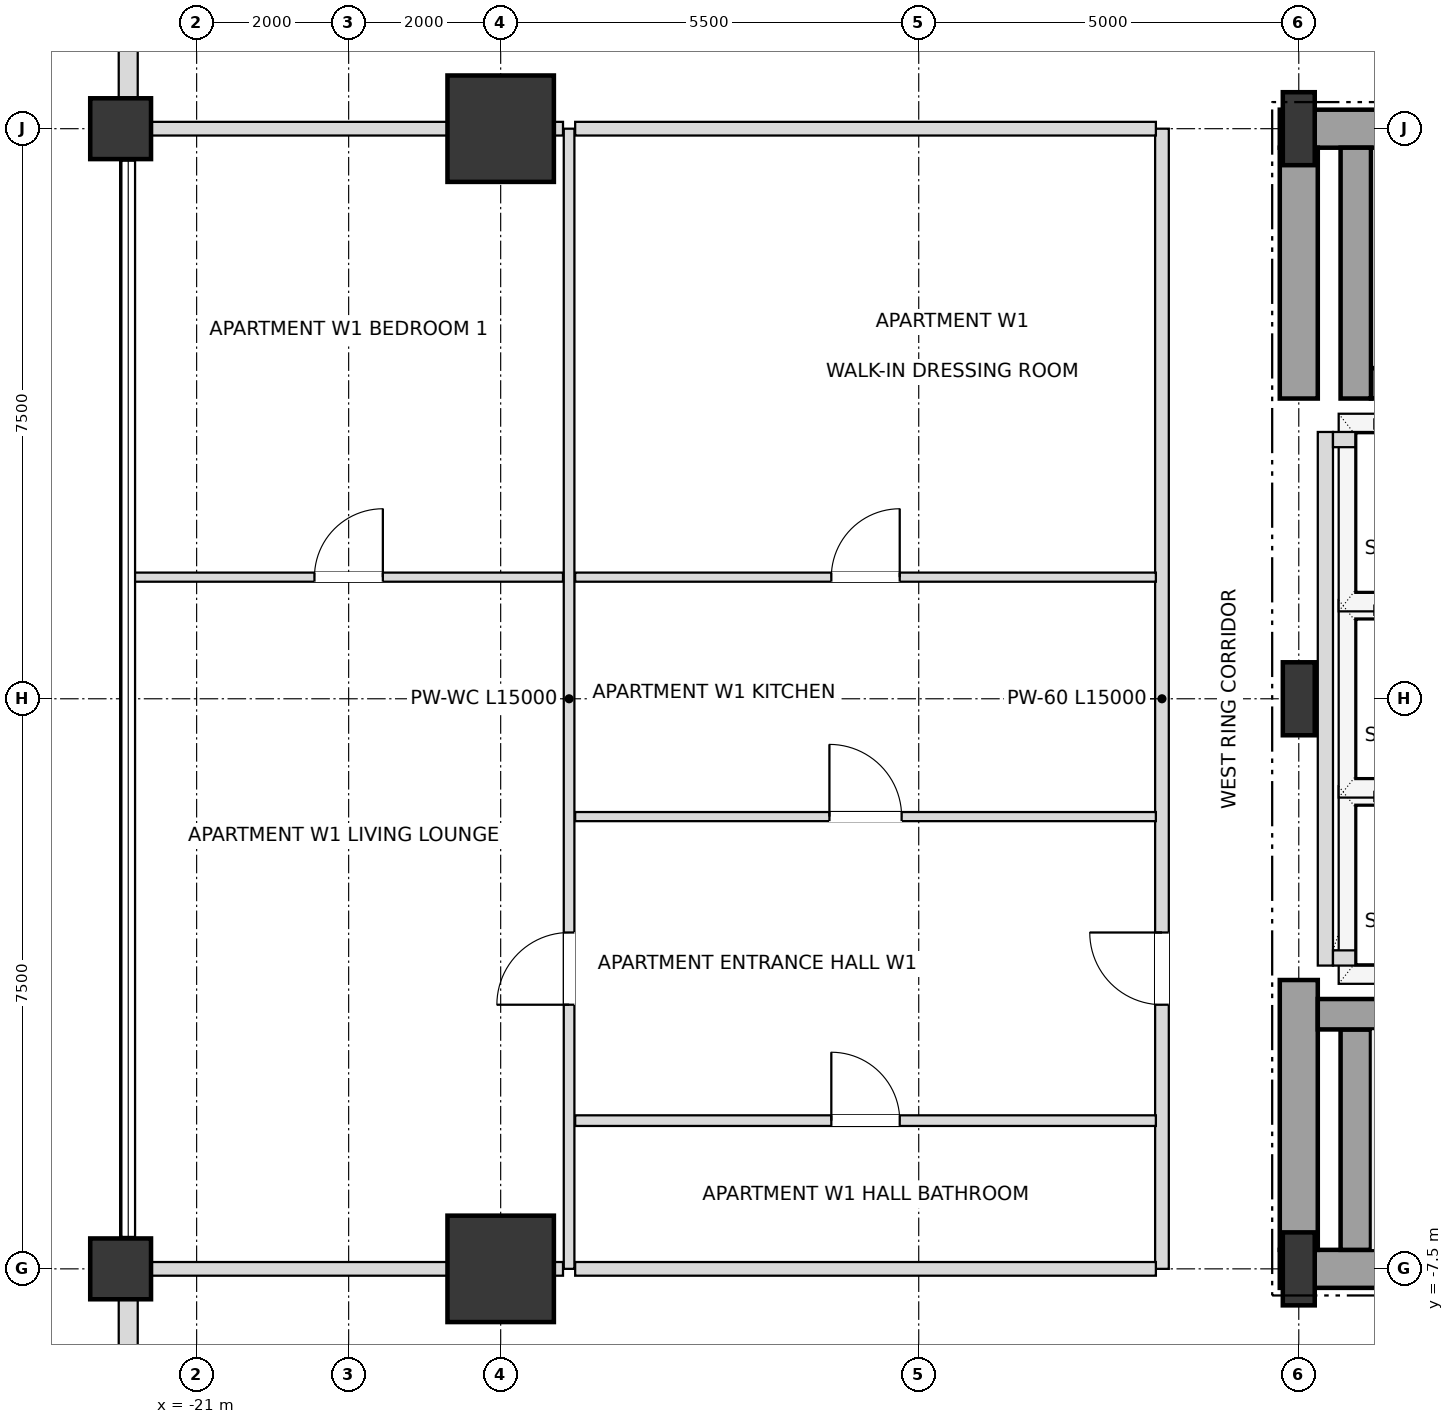
"""IFC4 building model, lengths in metres.
Left out: names, types, materials, properties, quantities, classifications, styles, units other than length and angle.
Written with IfcOpenShell. Run it as: python <this file> out.ifc"""

import sys

from ifc_helpers import new_model, si_unit, direction, frame, frame_2d, origin, origin_2d, place, context, subcontext, project, spatial, rectangle, i_section, extrude, element, fill, save


model = new_model("IFC4")
c1 = context("Model", 3, precision=1e-05, world=origin(), true_north=direction((0.0, 1.0)))
c2 = subcontext(c1, "Body", "Model", "MODEL_VIEW")
j1 = project(units=[si_unit("LENGTHUNIT", "METRE"), si_unit("PLANEANGLEUNIT", "RADIAN")], contexts=[c1])
p1 = place(None, origin())
s1 = spatial("IfcSite", under=j1, at=p1, CompositionType="ELEMENT")
p2 = place(p1, origin())
s2 = spatial("IfcBuilding", under=s1, at=p2, CompositionType="ELEMENT")
p3 = place(p2, frame((0.0, 0.0, 68.4)))
s3 = spatial("IfcBuildingStorey", under=s2, at=p3, CompositionType="ELEMENT", Elevation=68.4)
for number, where, z_axis, x_axis in (
    (1, (-6.5, -7.5, 0.0), (0.0, 0.0, 1.0), (1.0, 0.0, 0.0)),
    (2, (-6.5, 0.0, 0.0), (0.0, 0.0, 1.0), (1.0, 0.0, 0.0)),
    (3, (-6.5, 7.5, 0.0), (0.0, 0.0, 1.0), (1.0, 0.0, 0.0)),
):
    element("IfcColumn", number, at=place(p3, frame(where, z_axis=z_axis, x_axis=x_axis)), inside=s3, PredefinedType="COLUMN", context=c2, shape_type="SweptSolid", body=[
        extrude(i_section(OverallWidth=0.42, OverallDepth=0.96, WebThickness=0.022, FlangeThickness=0.034, at=origin_2d()), origin(), (0.0, 0.0, 1.0), 3.6),
    ])
for number, where, z_axis, x_axis in (
    (4, (-17.0, 7.5, 0.0), (0.0, 0.0, 1.0), (1.0, 0.0, 0.0)),
    (5, (-17.0, -7.5, 0.0), (0.0, 0.0, 1.0), (1.0, 0.0, 0.0)),
):
    element("IfcColumn", number, at=place(p3, frame(where, z_axis=z_axis, x_axis=x_axis)), inside=s3, PredefinedType="USERDEFINED", context=c2, shape_type="SweptSolid", body=[
        extrude(rectangle(XDim=1.4, YDim=1.4, at=origin_2d()), origin(), (0.0, 0.0, 1.0), 3.6),
    ])
for number, where, z_axis, x_axis in (
    (6, (-22.0, -7.5, 0.0), (0.0, 0.0, 1.0), (1.0, 0.0, 0.0)),
    (7, (-22.0, 7.5, 0.0), (0.0, 0.0, 1.0), (1.0, 0.0, 0.0)),
):
    element("IfcColumn", number, at=place(p3, frame(where, z_axis=z_axis, x_axis=x_axis)), inside=s3, PredefinedType="COLUMN", context=c2, shape_type="SweptSolid", body=[
        extrude(rectangle(XDim=0.8, YDim=0.8, at=origin_2d()), origin(), (0.0, 0.0, 1.0), 3.6),
    ])
p4 = place(p3, frame((-21.9, 12.605, 0.0), z_axis=(0.0, 0.0, 1.0), x_axis=(0.0, -1.0, 0.0)))
e8 = element("IfcWall", 8, at=p4, inside=s3, PredefinedType="SOLIDWALL", context=c2, shape_type="SweptSolid", body=[
    extrude(rectangle(XDim=4.71, YDim=0.25, at=frame_2d((2.355, 0.0))), origin(), (0.0, 0.0, 1.0), 2.736),
])
p5 = place(p4, frame((1.455, 0.0, 0.72)))
e9 = element("IfcOpeningElement", 9, at=p5, cuts=e8, PredefinedType="OPENING", context=c2, shape_type="SweptSolid", body=[
    extrude(rectangle(XDim=1.8, YDim=1.68, at=frame_2d((0.9, 0.84))), frame((0.0, 0.135, 0.0), z_axis=(0.0, -1.0, 0.0), x_axis=(1.0, 0.0, 0.0)), (0.0, 0.0, 1.0), 0.27),
])
p6 = place(p3, frame((-21.9, -7.895, 0.0), z_axis=(0.0, 0.0, 1.0), x_axis=(0.0, -1.0, 0.0)))
e10 = element("IfcWall", 10, at=p6, inside=s3, PredefinedType="SOLIDWALL", context=c2, shape_type="SweptSolid", body=[
    extrude(rectangle(XDim=4.71, YDim=0.25, at=frame_2d((2.355, 0.0))), origin(), (0.0, 0.0, 1.0), 2.736),
])
p7 = place(p6, frame((1.455, 0.0, 0.72)))
e11 = element("IfcOpeningElement", 11, at=p7, cuts=e10, PredefinedType="OPENING", context=c2, shape_type="SweptSolid", body=[
    extrude(rectangle(XDim=1.8, YDim=1.68, at=frame_2d((0.9, 0.84))), frame((0.0, 0.135, 0.0), z_axis=(0.0, -1.0, 0.0), x_axis=(1.0, 0.0, 0.0)), (0.0, 0.0, 1.0), 0.27),
])
p8 = place(p3, frame((-6.75, -7.5, 0.0), z_axis=(0.0, 0.0, 1.0), x_axis=(1.0, 0.0, 0.0)))
e12 = element("IfcWall", 12, at=p8, inside=s3, PredefinedType="SHEAR", context=c2, shape_type="SweptSolid", body=[
    extrude(rectangle(XDim=6.75, YDim=0.5, at=frame_2d((3.375, 0.0))), origin(), (0.0, 0.0, 1.0), 3.38),
])
p9 = place(p3, frame((-6.75, 7.5, 0.0), z_axis=(0.0, 0.0, 1.0), x_axis=(1.0, 0.0, 0.0)))
e13 = element("IfcWall", 13, at=p9, inside=s3, PredefinedType="SHEAR", context=c2, shape_type="SweptSolid", body=[
    extrude(rectangle(XDim=6.75, YDim=0.5, at=frame_2d((3.375, 0.0))), origin(), (0.0, 0.0, 1.0), 3.38),
])
p10 = place(p9, frame((1.65, 0.0, 0.0)))
e14 = element("IfcOpeningElement", 14, at=p10, cuts=e13, PredefinedType="OPENING", context=c2, shape_type="SweptSolid", body=[
    extrude(rectangle(XDim=1.05, YDim=2.15, at=frame_2d((0.525, 1.075))), frame((0.0, 0.26, 0.0), z_axis=(0.0, -1.0, 0.0), x_axis=(1.0, 0.0, 0.0)), (0.0, 0.0, 1.0), 0.52),
])
p11 = place(p3, frame((-6.5, -7.25, 0.0), z_axis=(0.0, 0.0, 1.0), x_axis=(0.0, 1.0, 0.0)))
e15 = element("IfcWall", 15, at=p11, inside=s3, PredefinedType="SHEAR", context=c2, shape_type="SweptSolid", body=[
    extrude(rectangle(XDim=3.55, YDim=0.5, at=frame_2d((1.775, 0.0))), origin(), (0.0, 0.0, 1.0), 3.38),
])
p12 = place(p3, frame((-6.5, 3.95, 0.0), z_axis=(0.0, 0.0, 1.0), x_axis=(0.0, 1.0, 0.0)))
e16 = element("IfcWall", 16, at=p12, inside=s3, PredefinedType="SHEAR", context=c2, shape_type="SweptSolid", body=[
    extrude(rectangle(XDim=3.3, YDim=0.5, at=frame_2d((1.65, 0.0))), origin(), (0.0, 0.0, 1.0), 3.38),
])
p13 = place(p3, frame((-5.75, -7.25, 0.0), z_axis=(0.0, 0.0, 1.0), x_axis=(0.0, 1.0, 0.0)))
e17 = element("IfcWall", 17, at=p13, inside=s3, PredefinedType="SHEAR", context=c2, shape_type="SweptSolid", body=[
    extrude(rectangle(XDim=2.9, YDim=0.4, at=frame_2d((1.45, 0.0))), origin(), (0.0, 0.0, 1.0), 3.38),
])
p14 = place(p3, frame((-6.25, -4.15, 0.0), z_axis=(0.0, 0.0, 1.0), x_axis=(1.0, 0.0, 0.0)))
e18 = element("IfcWall", 18, at=p14, inside=s3, PredefinedType="SHEAR", context=c2, shape_type="SweptSolid", body=[
    extrude(rectangle(XDim=7.78, YDim=0.4, at=frame_2d((3.89, 0.0))), origin(), (0.0, 0.0, 1.0), 3.38),
])
p15 = place(p3, frame((-5.55, 4.15, 0.0), z_axis=(0.0, 0.0, 1.0), x_axis=(1.0, 0.0, 0.0)))
e19 = element("IfcWall", 19, at=p15, inside=s3, PredefinedType="SHEAR", context=c2, shape_type="SweptSolid", body=[
    extrude(rectangle(XDim=7.08, YDim=0.4, at=frame_2d((3.54, 0.0))), origin(), (0.0, 0.0, 1.0), 3.38),
])
p16 = place(p3, frame((-5.75, 3.95, 0.0), z_axis=(0.0, 0.0, 1.0), x_axis=(0.0, 1.0, 0.0)))
e20 = element("IfcWall", 20, at=p16, inside=s3, PredefinedType="SHEAR", context=c2, shape_type="SweptSolid", body=[
    extrude(rectangle(XDim=3.3, YDim=0.4, at=frame_2d((1.65, 0.0))), origin(), (0.0, 0.0, 1.0), 3.38),
])
p17 = place(p3, frame((-6.15, -3.51, 0.0), z_axis=(0.0, 0.0, 1.0), x_axis=(0.0, 1.0, 0.0)))
e21 = element("IfcWall", 21, at=p17, inside=s3, PredefinedType="SOLIDWALL", context=c2, shape_type="SweptSolid", body=[
    extrude(rectangle(XDim=7.02, YDim=0.2, at=frame_2d((3.51, 0.0))), origin(), (0.0, 0.0, 1.0), 3.38),
])
for number, where, z_axis, x_axis in (
    (22, (-6.05, -3.41, 0.0), (0.0, 0.0, 1.0), (1.0, 0.0, 0.0)),
    (23, (-6.05, 3.41, 0.0), (0.0, 0.0, 1.0), (1.0, 0.0, 0.0)),
):
    element("IfcWall", number, at=place(p3, frame(where, z_axis=z_axis, x_axis=x_axis)), inside=s3, PredefinedType="SOLIDWALL", context=c2, shape_type="SweptSolid", body=[
        extrude(rectangle(XDim=2.2, YDim=0.2, at=frame_2d((1.1, 0.0))), origin(), (0.0, 0.0, 1.0), 3.38),
    ])
p18 = place(p3, frame((-16.1, -7.5, 0.0), z_axis=(0.0, 0.0, 1.0), x_axis=(0.0, 1.0, 0.0)))
e24 = element("IfcWall", 24, at=p18, inside=s3, PredefinedType="PARTITIONING", context=c2, shape_type="SweptSolid", body=[
    extrude(rectangle(XDim=15.0, YDim=0.14, at=frame_2d((7.5, 0.0))), origin(), (0.0, 0.0, 1.0), 3.38),
])
p19 = place(p18, frame((3.475, 0.0, 0.0)))
e25 = element("IfcOpeningElement", 25, at=p19, cuts=e24, PredefinedType="OPENING", context=c2, shape_type="SweptSolid", body=[
    extrude(rectangle(XDim=0.95, YDim=2.1, at=frame_2d((0.475, 1.05))), frame((0.0, 0.08, 0.0), z_axis=(0.0, -1.0, 0.0), x_axis=(1.0, 0.0, 0.0)), (0.0, 0.0, 1.0), 0.16),
])
p20 = place(p3, frame((-8.3, -7.5, 0.0), z_axis=(0.0, 0.0, 1.0), x_axis=(0.0, 1.0, 0.0)))
e26 = element("IfcWall", 26, at=p20, inside=s3, PredefinedType="PARTITIONING", context=c2, shape_type="SweptSolid", body=[
    extrude(rectangle(XDim=15.0, YDim=0.18, at=frame_2d((7.5, 0.0))), origin(), (0.0, 0.0, 1.0), 3.38),
])
p21 = place(p20, frame((3.475, 0.0, 0.0)))
e27 = element("IfcOpeningElement", 27, at=p21, cuts=e26, PredefinedType="OPENING", context=c2, shape_type="SweptSolid", body=[
    extrude(rectangle(XDim=0.95, YDim=2.15, at=frame_2d((0.475, 1.075))), frame((0.0, 0.1, 0.0), z_axis=(0.0, -1.0, 0.0), x_axis=(1.0, 0.0, 0.0)), (0.0, 0.0, 1.0), 0.2),
])
p22 = place(p3, frame((-21.9, -7.5, 0.0), z_axis=(0.0, 0.0, 1.0), x_axis=(1.0, 0.0, 0.0)))
e28 = element("IfcWall", 28, at=p22, inside=s3, PredefinedType="PARTITIONING", context=c2, shape_type="SweptSolid", body=[
    extrude(rectangle(XDim=5.72, YDim=0.18, at=frame_2d((2.86, 0.0))), origin(), (0.0, 0.0, 1.0), 2.816),
])
p23 = place(p3, frame((-16.02, -7.5, 0.0), z_axis=(0.0, 0.0, 1.0), x_axis=(1.0, 0.0, 0.0)))
e29 = element("IfcWall", 29, at=p23, inside=s3, PredefinedType="PARTITIONING", context=c2, shape_type="SweptSolid", body=[
    extrude(rectangle(XDim=7.64, YDim=0.18, at=frame_2d((3.82, 0.0))), origin(), (0.0, 0.0, 1.0), 2.816),
])
p24 = place(p3, frame((-16.02, -5.55, 0.0), z_axis=(0.0, 0.0, 1.0), x_axis=(1.0, 0.0, 0.0)))
e30 = element("IfcWall", 30, at=p24, inside=s3, PredefinedType="PARTITIONING", context=c2, shape_type="SweptSolid", body=[
    extrude(rectangle(XDim=7.64, YDim=0.14, at=frame_2d((3.82, 0.0))), origin(), (0.0, 0.0, 1.0), 2.948),
])
p25 = place(p24, frame((3.37, 0.0, 0.0)))
e31 = element("IfcOpeningElement", 31, at=p25, cuts=e30, PredefinedType="OPENING", context=c2, shape_type="SweptSolid", body=[
    extrude(rectangle(XDim=0.9, YDim=2.1, at=frame_2d((0.45, 1.05))), frame((0.0, 0.08, 0.0), z_axis=(0.0, -1.0, 0.0), x_axis=(1.0, 0.0, 0.0)), (0.0, 0.0, 1.0), 0.16),
])
p26 = place(p3, frame((-16.02, -1.55, 0.0), z_axis=(0.0, 0.0, 1.0), x_axis=(1.0, 0.0, 0.0)))
e32 = element("IfcWall", 32, at=p26, inside=s3, PredefinedType="PARTITIONING", context=c2, shape_type="SweptSolid", body=[
    extrude(rectangle(XDim=7.64, YDim=0.12, at=frame_2d((3.82, 0.0))), origin(), (0.0, 0.0, 1.0), 2.948),
])
p27 = place(p26, frame((3.345, 0.0, 0.0)))
e33 = element("IfcOpeningElement", 33, at=p27, cuts=e32, PredefinedType="OPENING", context=c2, shape_type="SweptSolid", body=[
    extrude(rectangle(XDim=0.95, YDim=2.1, at=frame_2d((0.475, 1.05))), frame((0.0, 0.07, 0.0), z_axis=(0.0, -1.0, 0.0), x_axis=(1.0, 0.0, 0.0)), (0.0, 0.0, 1.0), 0.14),
])
p28 = place(p3, frame((-21.82, 1.6, 0.0), z_axis=(0.0, 0.0, 1.0), x_axis=(1.0, 0.0, 0.0)))
e34 = element("IfcWall", 34, at=p28, inside=s3, PredefinedType="PARTITIONING", context=c2, shape_type="SweptSolid", body=[
    extrude(rectangle(XDim=5.64, YDim=0.12, at=frame_2d((2.82, 0.0))), origin(), (0.0, 0.0, 1.0), 2.816),
])
p29 = place(p28, frame((2.37, 0.0, 0.0)))
e35 = element("IfcOpeningElement", 35, at=p29, cuts=e34, PredefinedType="OPENING", context=c2, shape_type="SweptSolid", body=[
    extrude(rectangle(XDim=0.9, YDim=2.1, at=frame_2d((0.45, 1.05))), frame((0.0, 0.07, 0.0), z_axis=(0.0, -1.0, 0.0), x_axis=(1.0, 0.0, 0.0)), (0.0, 0.0, 1.0), 0.14),
])
p30 = place(p3, frame((-16.02, 1.6, 0.0), z_axis=(0.0, 0.0, 1.0), x_axis=(1.0, 0.0, 0.0)))
e36 = element("IfcWall", 36, at=p30, inside=s3, PredefinedType="PARTITIONING", context=c2, shape_type="SweptSolid", body=[
    extrude(rectangle(XDim=7.64, YDim=0.12, at=frame_2d((3.82, 0.0))), origin(), (0.0, 0.0, 1.0), 2.948),
])
p31 = place(p30, frame((3.37, 0.0, 0.0)))
e37 = element("IfcOpeningElement", 37, at=p31, cuts=e36, PredefinedType="OPENING", context=c2, shape_type="SweptSolid", body=[
    extrude(rectangle(XDim=0.9, YDim=2.1, at=frame_2d((0.45, 1.05))), frame((0.0, 0.07, 0.0), z_axis=(0.0, -1.0, 0.0), x_axis=(1.0, 0.0, 0.0)), (0.0, 0.0, 1.0), 0.14),
])
p32 = place(p3, frame((-21.9, 7.5, 0.0), z_axis=(0.0, 0.0, 1.0), x_axis=(1.0, 0.0, 0.0)))
e38 = element("IfcWall", 38, at=p32, inside=s3, PredefinedType="PARTITIONING", context=c2, shape_type="SweptSolid", body=[
    extrude(rectangle(XDim=5.72, YDim=0.18, at=frame_2d((2.86, 0.0))), origin(), (0.0, 0.0, 1.0), 2.816),
])
p33 = place(p3, frame((-16.02, 7.5, 0.0), z_axis=(0.0, 0.0, 1.0), x_axis=(1.0, 0.0, 0.0)))
e39 = element("IfcWall", 39, at=p33, inside=s3, PredefinedType="PARTITIONING", context=c2, shape_type="SweptSolid", body=[
    extrude(rectangle(XDim=7.64, YDim=0.18, at=frame_2d((3.82, 0.0))), origin(), (0.0, 0.0, 1.0), 2.816),
])
p34 = place(p25, origin())
e40 = element("IfcDoor", 40, at=p34, inside=s3, OperationType="SINGLE_SWING_LEFT", PredefinedType="DOOR", context=c2, shape_type="SweptSolid", body=[
    extrude(rectangle(XDim=0.9, YDim=2.1, at=frame_2d((0.45, 1.05))), frame((0.0, 0.025, 0.0), z_axis=(0.0, -1.0, 0.0), x_axis=(1.0, 0.0, 0.0)), (0.0, 0.0, 1.0), 0.05),
])
fill(e31, e40)
p35 = place(p21, origin())
e41 = element("IfcDoor", 41, at=p35, inside=s3, OperationType="SINGLE_SWING_RIGHT", PredefinedType="DOOR", context=c2, shape_type="SweptSolid", body=[
    extrude(rectangle(XDim=0.95, YDim=2.15, at=frame_2d((0.475, 1.075))), frame((0.0, 0.025, 0.0), z_axis=(0.0, -1.0, 0.0), x_axis=(1.0, 0.0, 0.0)), (0.0, 0.0, 1.0), 0.05),
])
fill(e27, e41)
p36 = place(p27, origin())
e42 = element("IfcDoor", 42, at=p36, inside=s3, OperationType="SINGLE_SWING_LEFT", PredefinedType="DOOR", context=c2, shape_type="SweptSolid", body=[
    extrude(rectangle(XDim=0.95, YDim=2.1, at=frame_2d((0.475, 1.05))), frame((0.0, 0.025, 0.0), z_axis=(0.0, -1.0, 0.0), x_axis=(1.0, 0.0, 0.0)), (0.0, 0.0, 1.0), 0.05),
])
fill(e33, e42)
p37 = place(p31, origin())
e43 = element("IfcDoor", 43, at=p37, inside=s3, OperationType="SINGLE_SWING_RIGHT", PredefinedType="DOOR", context=c2, shape_type="SweptSolid", body=[
    extrude(rectangle(XDim=0.9, YDim=2.1, at=frame_2d((0.45, 1.05))), frame((0.0, 0.025, 0.0), z_axis=(0.0, -1.0, 0.0), x_axis=(1.0, 0.0, 0.0)), (0.0, 0.0, 1.0), 0.05),
])
fill(e37, e43)
p38 = place(p19, origin())
e44 = element("IfcDoor", 44, at=p38, inside=s3, OperationType="SINGLE_SWING_LEFT", PredefinedType="DOOR", context=c2, shape_type="SweptSolid", body=[
    extrude(rectangle(XDim=0.95, YDim=2.1, at=frame_2d((0.475, 1.05))), frame((0.0, 0.025, 0.0), z_axis=(0.0, -1.0, 0.0), x_axis=(1.0, 0.0, 0.0)), (0.0, 0.0, 1.0), 0.05),
])
fill(e25, e44)
p39 = place(p29, origin())
e45 = element("IfcDoor", 45, at=p39, inside=s3, OperationType="SINGLE_SWING_RIGHT", PredefinedType="DOOR", context=c2, shape_type="SweptSolid", body=[
    extrude(rectangle(XDim=0.9, YDim=2.1, at=frame_2d((0.45, 1.05))), frame((0.0, 0.025, 0.0), z_axis=(0.0, -1.0, 0.0), x_axis=(1.0, 0.0, 0.0)), (0.0, 0.0, 1.0), 0.05),
])
fill(e35, e45)
save(model, sys.argv[1])
